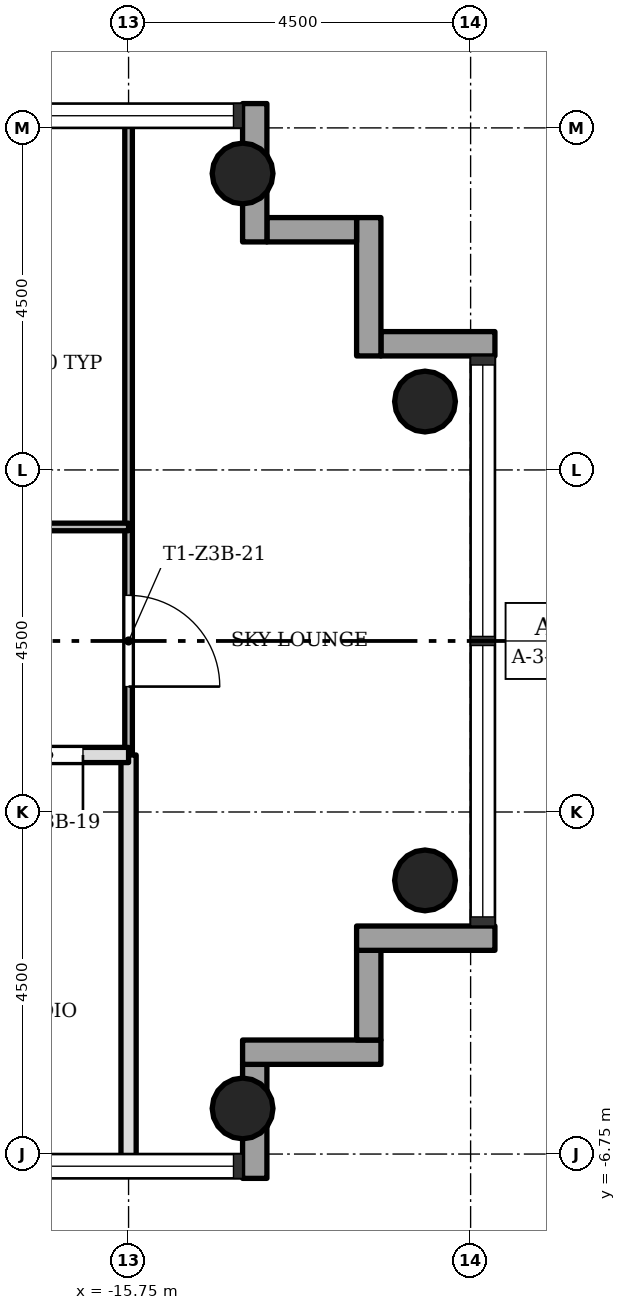
"""IFC4 building model, lengths in metres.
Left out: names, types, materials, properties, quantities, classifications, styles, units other than length and angle.
Written with IfcOpenShell. Run it as: python <this file> out.ifc"""

import sys

from ifc_helpers import new_model, si_unit, direction, frame, frame_2d, origin, origin_2d, place, context, subcontext, project, spatial, rectangle, hollow_circle, extrude, element, fill, save


model = new_model("IFC4")
c1 = context("Model", 3, precision=1e-05, world=origin(), true_north=direction((0.0, 1.0)))
c2 = subcontext(c1, "Body", "Model", "MODEL_VIEW")
j1 = project(units=[si_unit("LENGTHUNIT", "METRE"), si_unit("PLANEANGLEUNIT", "RADIAN")], contexts=[c1])
p1 = place(None, origin())
s1 = spatial("IfcSite", under=j1, at=p1, CompositionType="ELEMENT")
p2 = place(p1, origin())
s2 = spatial("IfcBuilding", under=s1, at=p2, CompositionType="ELEMENT")
p3 = place(p2, frame((0.0, 0.0, 147.3)))
s3 = spatial("IfcBuildingStorey", under=s2, at=p3, CompositionType="ELEMENT", Elevation=147.3)
for number, where, z_axis, x_axis in (
    (1, (-14.25, -6.15, 0.0), (0.0, 0.0, 1.0), (1.0, 0.0, 0.0)),
    (2, (-14.25, 6.15, 0.0), (0.0, 0.0, 1.0), (1.0, 0.0, 0.0)),
    (3, (-11.85, -3.15, 0.0), (0.0, 0.0, 1.0), (1.0, 0.0, 0.0)),
    (4, (-11.85, 3.15, 0.0), (0.0, 0.0, 1.0), (1.0, 0.0, 0.0)),
):
    element("IfcColumn", number, at=place(p3, frame(where, z_axis=z_axis, x_axis=x_axis)), inside=s3, PredefinedType="COLUMN", context=c2, shape_type="SweptSolid", body=[
        extrude(hollow_circle(Radius=0.4, WallThickness=0.028, at=origin_2d()), origin(), (0.0, 0.0, 1.0), 3.4),
    ])
p4 = place(p3, frame((-14.09, -7.07, -0.3), z_axis=(0.0, 0.0, 1.0), x_axis=(0.0, 1.0, 0.0)))
e5 = element("IfcWall", 5, at=p4, inside=s3, PredefinedType="STANDARD", context=c2, shape_type="SweptSolid", body=[
    extrude(rectangle(XDim=1.5, YDim=0.32, at=frame_2d((0.75, 0.0))), origin(), (0.0, 0.0, 1.0), 3.4),
])
p5 = place(p3, frame((-14.25, -5.41, -0.3), z_axis=(0.0, 0.0, 1.0), x_axis=(1.0, 0.0, 0.0)))
e6 = element("IfcWall", 6, at=p5, inside=s3, PredefinedType="STANDARD", context=c2, shape_type="SweptSolid", body=[
    extrude(rectangle(XDim=1.82, YDim=0.32, at=frame_2d((0.91, 0.0))), origin(), (0.0, 0.0, 1.0), 3.4),
])
p6 = place(p3, frame((-12.59, -5.25, -0.3), z_axis=(0.0, 0.0, 1.0), x_axis=(0.0, 1.0, 0.0)))
e7 = element("IfcWall", 7, at=p6, inside=s3, PredefinedType="STANDARD", context=c2, shape_type="SweptSolid", body=[
    extrude(rectangle(XDim=1.18, YDim=0.32, at=frame_2d((0.59, 0.0))), origin(), (0.0, 0.0, 1.0), 3.4),
])
p7 = place(p3, frame((-12.75, -3.91, -0.3), z_axis=(0.0, 0.0, 1.0), x_axis=(1.0, 0.0, 0.0)))
e8 = element("IfcWall", 8, at=p7, inside=s3, PredefinedType="STANDARD", context=c2, shape_type="SweptSolid", body=[
    extrude(rectangle(XDim=1.82, YDim=0.32, at=frame_2d((0.91, 0.0))), origin(), (0.0, 0.0, 1.0), 3.4),
])
p8 = place(p3, frame((-10.93, 3.91, -0.3), z_axis=(0.0, 0.0, 1.0), x_axis=(-1.0, 0.0, 0.0)))
e9 = element("IfcWall", 9, at=p8, inside=s3, PredefinedType="STANDARD", context=c2, shape_type="SweptSolid", body=[
    extrude(rectangle(XDim=1.5, YDim=0.32, at=frame_2d((0.75, 0.0))), origin(), (0.0, 0.0, 1.0), 3.4),
])
p9 = place(p3, frame((-12.59, 3.75, -0.3), z_axis=(0.0, 0.0, 1.0), x_axis=(0.0, 1.0, 0.0)))
e10 = element("IfcWall", 10, at=p9, inside=s3, PredefinedType="STANDARD", context=c2, shape_type="SweptSolid", body=[
    extrude(rectangle(XDim=1.82, YDim=0.32, at=frame_2d((0.91, 0.0))), origin(), (0.0, 0.0, 1.0), 3.4),
])
p10 = place(p3, frame((-12.75, 5.41, -0.3), z_axis=(0.0, 0.0, 1.0), x_axis=(-1.0, 0.0, 0.0)))
e11 = element("IfcWall", 11, at=p10, inside=s3, PredefinedType="STANDARD", context=c2, shape_type="SweptSolid", body=[
    extrude(rectangle(XDim=1.18, YDim=0.32, at=frame_2d((0.59, 0.0))), origin(), (0.0, 0.0, 1.0), 3.4),
])
p11 = place(p3, frame((-14.09, 5.25, -0.3), z_axis=(0.0, 0.0, 1.0), x_axis=(0.0, 1.0, 0.0)))
e12 = element("IfcWall", 12, at=p11, inside=s3, PredefinedType="STANDARD", context=c2, shape_type="SweptSolid", body=[
    extrude(rectangle(XDim=1.82, YDim=0.32, at=frame_2d((0.91, 0.0))), origin(), (0.0, 0.0, 1.0), 3.4),
])
p12 = place(p3, frame((-15.75, -1.5, 0.0), z_axis=(0.0, 0.0, 1.0), x_axis=(0.0, 1.0, 0.0)))
e13 = element("IfcWall", 13, at=p12, inside=s3, PredefinedType="PARTITIONING", context=c2, shape_type="SweptSolid", body=[
    extrude(rectangle(XDim=8.35, YDim=0.1, at=frame_2d((4.175, 0.0))), origin(), (0.0, 0.0, 1.0), 3.0),
])
p13 = place(p12, frame((0.9, 0.0, 0.0)))
e14 = element("IfcOpeningElement", 14, at=p13, cuts=e13, PredefinedType="OPENING", context=c2, shape_type="SweptSolid", body=[
    extrude(rectangle(XDim=1.2, YDim=2.1, at=frame_2d((0.6, 1.05))), frame((0.0, 0.06, 0.0), z_axis=(0.0, -1.0, 0.0), x_axis=(1.0, 0.0, 0.0)), (0.0, 0.0, 1.0), 0.12),
])
p14 = place(p3, frame((-15.75, -6.85, 0.0), z_axis=(0.0, 0.0, 1.0), x_axis=(0.0, 1.0, 0.0)))
e15 = element("IfcWall", 15, at=p14, inside=s3, PredefinedType="SOLIDWALL", context=c2, shape_type="SweptSolid", body=[
    extrude(rectangle(XDim=5.35, YDim=0.2, at=frame_2d((2.675, 0.0))), origin(), (0.0, 0.0, 1.0), 3.0),
])
p15 = place(p3, frame((-20.25, -1.5, 0.0), z_axis=(0.0, 0.0, 1.0), x_axis=(1.0, 0.0, 0.0)))
e16 = element("IfcWall", 16, at=p15, inside=s3, PredefinedType="SOLIDWALL", context=c2, shape_type="SweptSolid", body=[
    extrude(rectangle(XDim=4.5, YDim=0.2, at=frame_2d((2.25, 0.0))), origin(), (0.0, 0.0, 1.0), 3.0),
])
p16 = place(p15, frame((3.0, 0.0, 0.0)))
e17 = element("IfcOpeningElement", 17, at=p16, cuts=e16, PredefinedType="OPENING", context=c2, shape_type="SweptSolid", body=[
    extrude(rectangle(XDim=0.9, YDim=2.1, at=frame_2d((0.45, 1.05))), frame((0.0, 0.11, 0.0), z_axis=(0.0, -1.0, 0.0), x_axis=(1.0, 0.0, 0.0)), (0.0, 0.0, 1.0), 0.22),
])
p17 = place(p3, frame((-20.25, 1.5, 0.0), z_axis=(0.0, 0.0, 1.0), x_axis=(1.0, 0.0, 0.0)))
e18 = element("IfcWall", 18, at=p17, inside=s3, PredefinedType="PARTITIONING", context=c2, shape_type="SweptSolid", body=[
    extrude(rectangle(XDim=4.5, YDim=0.1, at=frame_2d((2.25, 0.0))), origin(), (0.0, 0.0, 1.0), 3.0),
])
p18 = place(p17, frame((1.8, 0.0, 0.0)))
e19 = element("IfcOpeningElement", 19, at=p18, cuts=e18, PredefinedType="OPENING", context=c2, shape_type="SweptSolid", body=[
    extrude(rectangle(XDim=0.9, YDim=2.1, at=frame_2d((0.45, 1.05))), frame((0.0, 0.06, 0.0), z_axis=(0.0, -1.0, 0.0), x_axis=(1.0, 0.0, 0.0)), (0.0, 0.0, 1.0), 0.12),
])
p19 = place(p16, origin())
e20 = element("IfcDoor", 20, at=p19, inside=s3, OperationType="SINGLE_SWING_RIGHT", PredefinedType="DOOR", context=c2, shape_type="SweptSolid", body=[
    extrude(rectangle(XDim=0.9, YDim=2.1, at=frame_2d((0.45, 1.05))), frame((0.0, 0.025, 0.0), z_axis=(0.0, -1.0, 0.0), x_axis=(1.0, 0.0, 0.0)), (0.0, 0.0, 1.0), 0.05),
])
fill(e17, e20)
p20 = place(p13, origin())
e21 = element("IfcDoor", 21, at=p20, inside=s3, OperationType="SINGLE_SWING_LEFT", PredefinedType="DOOR", context=c2, shape_type="SweptSolid", body=[
    extrude(rectangle(XDim=1.2, YDim=2.1, at=frame_2d((0.6, 1.05))), frame((0.0, 0.025, 0.0), z_axis=(0.0, -1.0, 0.0), x_axis=(1.0, 0.0, 0.0)), (0.0, 0.0, 1.0), 0.05),
])
fill(e14, e21)
save(model, sys.argv[1])
